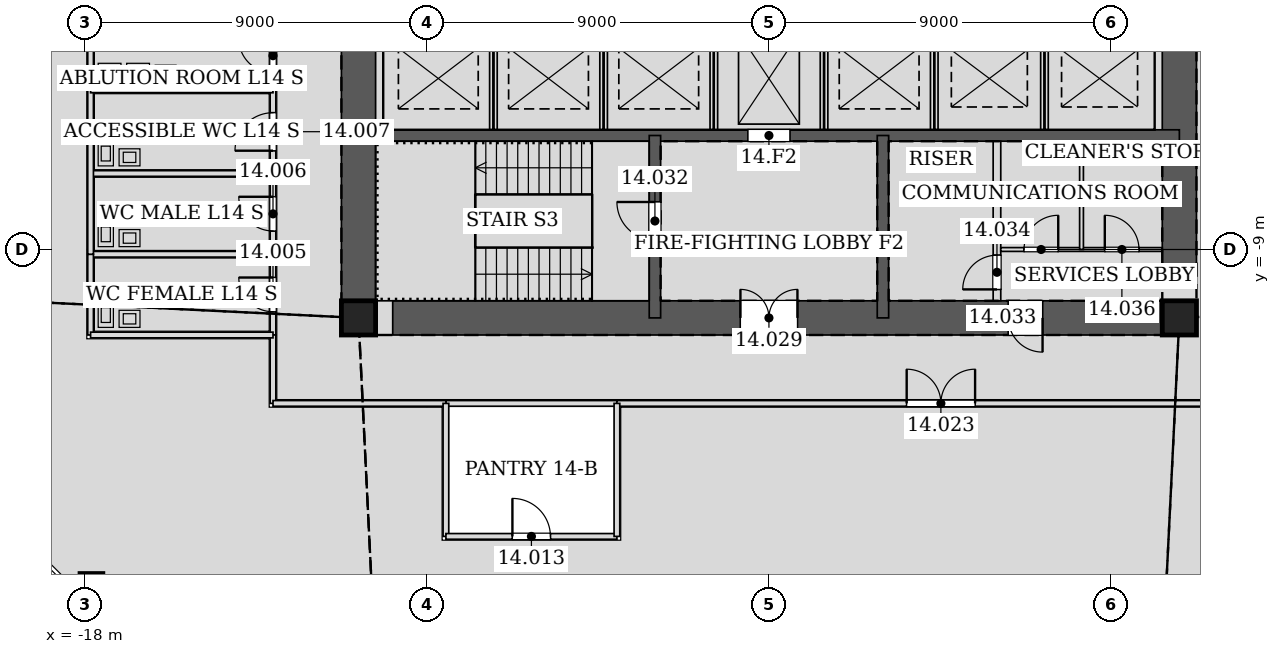
"""IFC4 building model, lengths in metres.
Left out: names, types, materials, properties, quantities, classifications, styles, units other than length and angle.
Written with IfcOpenShell. Run it as: python <this file> out.ifc"""

import sys

from ifc_helpers import new_model, si_unit, direction, frame, frame_2d, origin, origin_2d, place, context, subcontext, project, spatial, rectangle, hollow_rectangle, extrude, element, fill, save


model = new_model("IFC4")
c1 = context("Model", 3, precision=1e-05, world=origin(), true_north=direction((0.0, 1.0)))
c2 = subcontext(c1, "Body", "Model", "MODEL_VIEW")
j1 = project(units=[si_unit("LENGTHUNIT", "METRE"), si_unit("PLANEANGLEUNIT", "RADIAN")], contexts=[c1])
p1 = place(None, origin())
s1 = spatial("IfcSite", under=j1, at=p1, CompositionType="ELEMENT")
p2 = place(p1, origin())
s2 = spatial("IfcBuilding", under=s1, at=p2, CompositionType="ELEMENT")
p3 = place(p2, frame((0.0, 0.0, 66.6)))
s3 = spatial("IfcBuildingStorey", under=s2, at=p3, CompositionType="ELEMENT", Elevation=66.6)
p4 = place(p3, frame((-17.912, -17.912, 0.0), z_axis=(0.020046580746, 0.020046580746, 0.99959805382), x_axis=(-0.707106781187, 0.707106781187, 0.0)))
e1 = element("IfcColumn", 1, at=p4, inside=s3, PredefinedType="COLUMN", context=c2, shape_type="SweptSolid", body=[
    extrude(hollow_rectangle(XDim=0.6, YDim=0.6, WallThickness=0.032, at=origin_2d()), origin(), (0.0, 0.0, 1.0), 4.202),
])
for number, where, z_axis, x_axis in (
    (2, (-10.8, -10.8, 0.0), (0.0, 0.0, 1.0), (1.0, 0.0, 0.0)),
    (3, (10.8, -10.8, 0.0), (0.0, 0.0, 1.0), (1.0, 0.0, 0.0)),
):
    element("IfcColumn", number, at=place(p3, frame(where, z_axis=z_axis, x_axis=x_axis)), inside=s3, PredefinedType="COLUMN", context=c2, shape_type="SweptSolid", body=[
        extrude(hollow_rectangle(XDim=0.9, YDim=0.9, WallThickness=0.06, at=origin_2d()), origin(), (0.0, 0.0, 1.0), 4.2),
    ])
p5 = place(p3, frame((-10.8, -10.8, 0.0), z_axis=(0.0, 0.0, 1.0), x_axis=(1.0, 0.0, 0.0)))
e4 = element("IfcWall", 4, at=p5, inside=s3, PredefinedType="SOLIDWALL", context=c2, shape_type="SweptSolid", body=[
    extrude(rectangle(XDim=21.6, YDim=0.9, at=frame_2d((10.8, 0.0))), origin(), (0.0, 0.0, 1.0), 4.2),
])
p6 = place(p5, frame((10.05, 0.0, 0.0)))
e5 = element("IfcOpeningElement", 5, at=p6, cuts=e4, PredefinedType="OPENING", context=c2, shape_type="SweptSolid", body=[
    extrude(rectangle(XDim=1.5, YDim=2.1, at=frame_2d((0.75, 1.05))), frame((0.0, 0.46, 0.0), z_axis=(0.0, -1.0, 0.0), x_axis=(1.0, 0.0, 0.0)), (0.0, 0.0, 1.0), 0.92),
])
p7 = place(p5, frame((17.1, 0.0, 0.0)))
e6 = element("IfcOpeningElement", 6, at=p7, cuts=e4, PredefinedType="OPENING", context=c2, shape_type="SweptSolid", body=[
    extrude(rectangle(XDim=0.9, YDim=2.1, at=frame_2d((0.45, 1.05))), frame((0.0, 0.46, 0.0), z_axis=(0.0, -1.0, 0.0), x_axis=(1.0, 0.0, 0.0)), (0.0, 0.0, 1.0), 0.92),
])
p8 = place(p3, frame((10.8, -10.8, 0.0), z_axis=(0.0, 0.0, 1.0), x_axis=(0.0, 1.0, 0.0)))
e7 = element("IfcWall", 7, at=p8, inside=s3, PredefinedType="SOLIDWALL", context=c2, shape_type="SweptSolid", body=[
    extrude(rectangle(XDim=21.6, YDim=0.9, at=frame_2d((10.8, 0.0))), origin(), (0.0, 0.0, 1.0), 4.2),
])
p9 = place(p8, frame((11.7, 0.0, 0.0)))
e8 = element("IfcOpeningElement", 8, at=p9, cuts=e7, PredefinedType="OPENING", context=c2, shape_type="SweptSolid", body=[
    extrude(rectangle(XDim=1.2, YDim=2.1, at=frame_2d((0.6, 1.05))), frame((0.0, 0.46, 0.0), z_axis=(0.0, -1.0, 0.0), x_axis=(1.0, 0.0, 0.0)), (0.0, 0.0, 1.0), 0.92),
])
p10 = place(p8, frame((8.7, 0.0, 0.0)))
e9 = element("IfcOpeningElement", 9, at=p10, cuts=e7, PredefinedType="OPENING", context=c2, shape_type="SweptSolid", body=[
    extrude(rectangle(XDim=1.2, YDim=2.1, at=frame_2d((0.6, 1.05))), frame((0.0, 0.46, 0.0), z_axis=(0.0, -1.0, 0.0), x_axis=(1.0, 0.0, 0.0)), (0.0, 0.0, 1.0), 0.92),
])
p11 = place(p3, frame((-10.8, 10.8, 0.0), z_axis=(0.0, 0.0, 1.0), x_axis=(0.0, -1.0, 0.0)))
e10 = element("IfcWall", 10, at=p11, inside=s3, PredefinedType="SOLIDWALL", context=c2, shape_type="SweptSolid", body=[
    extrude(rectangle(XDim=21.6, YDim=0.9, at=frame_2d((10.8, 0.0))), origin(), (0.0, 0.0, 1.0), 4.2),
])
p12 = place(p11, frame((8.7, 0.0, 0.0)))
e11 = element("IfcOpeningElement", 11, at=p12, cuts=e10, PredefinedType="OPENING", context=c2, shape_type="SweptSolid", body=[
    extrude(rectangle(XDim=1.2, YDim=2.1, at=frame_2d((0.6, 1.05))), frame((0.0, 0.46, 0.0), z_axis=(0.0, -1.0, 0.0), x_axis=(1.0, 0.0, 0.0)), (0.0, 0.0, 1.0), 0.92),
])
p13 = place(p11, frame((11.7, 0.0, 0.0)))
e12 = element("IfcOpeningElement", 12, at=p13, cuts=e10, PredefinedType="OPENING", context=c2, shape_type="SweptSolid", body=[
    extrude(rectangle(XDim=1.2, YDim=2.1, at=frame_2d((0.6, 1.05))), frame((0.0, 0.46, 0.0), z_axis=(0.0, -1.0, 0.0), x_axis=(1.0, 0.0, 0.0)), (0.0, 0.0, 1.0), 0.92),
])
p14 = place(p3, frame((-10.8, -6.0, 0.0), z_axis=(0.0, 0.0, 1.0), x_axis=(1.0, 0.0, 0.0)))
e13 = element("IfcWall", 13, at=p14, inside=s3, PredefinedType="SOLIDWALL", context=c2, shape_type="SweptSolid", body=[
    extrude(rectangle(XDim=21.6, YDim=0.3, at=frame_2d((10.8, 0.0))), origin(), (0.0, 0.0, 1.0), 4.2),
])
p15 = place(p14, frame((10.25, 0.0, 0.0)))
e14 = element("IfcOpeningElement", 14, at=p15, cuts=e13, PredefinedType="OPENING", context=c2, shape_type="SweptSolid", body=[
    extrude(rectangle(XDim=1.1, YDim=2.1, at=frame_2d((0.55, 1.05))), frame((0.0, 0.16, 0.0), z_axis=(0.0, -1.0, 0.0), x_axis=(1.0, 0.0, 0.0)), (0.0, 0.0, 1.0), 0.32),
])
p16 = place(p3, frame((-3.0, -6.0, 0.0), z_axis=(0.0, 0.0, 1.0), x_axis=(0.0, -1.0, 0.0)))
e15 = element("IfcWall", 15, at=p16, inside=s3, PredefinedType="SOLIDWALL", context=c2, shape_type="SweptSolid", body=[
    extrude(rectangle(XDim=4.8, YDim=0.3, at=frame_2d((2.4, 0.0))), origin(), (0.0, 0.0, 1.0), 4.2),
])
p17 = place(p16, frame((1.75, 0.0, 0.0)))
e16 = element("IfcOpeningElement", 16, at=p17, cuts=e15, PredefinedType="OPENING", context=c2, shape_type="SweptSolid", body=[
    extrude(rectangle(XDim=1.0, YDim=2.1, at=frame_2d((0.5, 1.05))), frame((0.0, 0.16, 0.0), z_axis=(0.0, -1.0, 0.0), x_axis=(1.0, 0.0, 0.0)), (0.0, 0.0, 1.0), 0.32),
])
p18 = place(p3, frame((3.0, -6.0, 0.0), z_axis=(0.0, 0.0, 1.0), x_axis=(0.0, -1.0, 0.0)))
e17 = element("IfcWall", 17, at=p18, inside=s3, PredefinedType="SOLIDWALL", context=c2, shape_type="SweptSolid", body=[
    extrude(rectangle(XDim=4.8, YDim=0.3, at=frame_2d((2.4, 0.0))), origin(), (0.0, 0.0, 1.0), 4.2),
])
p19 = place(p3, frame((-13.05, -9.124, 0.0), z_axis=(0.0, 0.0, 1.0), x_axis=(0.0, -1.0, 0.0)))
e18 = element("IfcWall", 18, at=p19, inside=s3, PredefinedType="PARTITIONING", context=c2, shape_type="SweptSolid", body=[
    extrude(rectangle(XDim=2.127, YDim=0.15, at=frame_2d((1.063, 0.0))), origin(), (0.0, 0.0, 1.0), 3.014),
])
p20 = place(p19, frame((0.614, 0.0, 0.0)))
e19 = element("IfcOpeningElement", 19, at=p20, cuts=e18, PredefinedType="OPENING", context=c2, shape_type="SweptSolid", body=[
    extrude(rectangle(XDim=0.9, YDim=2.1, at=frame_2d((0.45, 1.05))), frame((0.0, 0.085, 0.0), z_axis=(0.0, -1.0, 0.0), x_axis=(1.0, 0.0, 0.0)), (0.0, 0.0, 1.0), 0.17),
])
p21 = place(p3, frame((-13.05, -6.999, 0.0), z_axis=(0.0, 0.0, 1.0), x_axis=(0.0, -1.0, 0.0)))
e20 = element("IfcWall", 20, at=p21, inside=s3, PredefinedType="PARTITIONING", context=c2, shape_type="SweptSolid", body=[
    extrude(rectangle(XDim=2.127, YDim=0.15, at=frame_2d((1.063, 0.0))), origin(), (0.0, 0.0, 1.0), 4.035),
])
p22 = place(p21, frame((0.614, 0.0, 0.0)))
e21 = element("IfcOpeningElement", 21, at=p22, cuts=e20, PredefinedType="OPENING", context=c2, shape_type="SweptSolid", body=[
    extrude(rectangle(XDim=0.9, YDim=2.1, at=frame_2d((0.45, 1.05))), frame((0.0, 0.085, 0.0), z_axis=(0.0, -1.0, 0.0), x_axis=(1.0, 0.0, 0.0)), (0.0, 0.0, 1.0), 0.17),
])
p23 = place(p3, frame((-13.05, -4.799, 0.0), z_axis=(0.0, 0.0, 1.0), x_axis=(0.0, -1.0, 0.0)))
e22 = element("IfcWall", 22, at=p23, inside=s3, PredefinedType="PARTITIONING", context=c2, shape_type="SweptSolid", body=[
    extrude(rectangle(XDim=2.202, YDim=0.15, at=frame_2d((1.101, 0.0))), origin(), (0.0, 0.0, 1.0), 4.035),
])
p24 = place(p23, frame((0.601, 0.0, 0.0)))
e23 = element("IfcOpeningElement", 23, at=p24, cuts=e22, PredefinedType="OPENING", context=c2, shape_type="SweptSolid", body=[
    extrude(rectangle(XDim=1.0, YDim=2.1, at=frame_2d((0.5, 1.05))), frame((0.0, 0.085, 0.0), z_axis=(0.0, -1.0, 0.0), x_axis=(1.0, 0.0, 0.0)), (0.0, 0.0, 1.0), 0.17),
])
p25 = place(p3, frame((-13.05, -2.999, 0.0), z_axis=(0.0, 0.0, 1.0), x_axis=(0.0, -1.0, 0.0)))
e24 = element("IfcWall", 24, at=p25, inside=s3, PredefinedType="PARTITIONING", context=c2, shape_type="SweptSolid", body=[
    extrude(rectangle(XDim=1.802, YDim=0.15, at=frame_2d((0.901, 0.0))), origin(), (0.0, 0.0, 1.0), 4.035),
])
p26 = place(p25, frame((0.451, 0.0, 0.0)))
e25 = element("IfcOpeningElement", 25, at=p26, cuts=e24, PredefinedType="OPENING", context=c2, shape_type="SweptSolid", body=[
    extrude(rectangle(XDim=0.9, YDim=2.1, at=frame_2d((0.45, 1.05))), frame((0.0, 0.085, 0.0), z_axis=(0.0, -1.0, 0.0), x_axis=(1.0, 0.0, 0.0)), (0.0, 0.0, 1.0), 0.17),
])
p27 = place(p3, frame((-8.501, -13.05, 0.0), z_axis=(0.0, 0.0, 1.0), x_axis=(1.0, 0.0, 0.0)))
e26 = element("IfcWall", 26, at=p27, inside=s3, PredefinedType="PARTITIONING", context=c2, shape_type="SweptSolid", body=[
    extrude(rectangle(XDim=4.502, YDim=0.15, at=frame_2d((2.251, 0.0))), origin(), (0.0, 0.0, 1.0), 4.035),
])
p28 = place(p3, frame((-13.05, -11.249, 0.0), z_axis=(0.0, 0.0, 1.0), x_axis=(0.0, -1.0, 0.0)))
e27 = element("IfcWall", 27, at=p28, inside=s3, PredefinedType="PARTITIONING", context=c2, shape_type="SweptSolid", body=[
    extrude(rectangle(XDim=1.801, YDim=0.15, at=frame_2d((0.9, 0.0))), origin(), (0.0, 0.0, 1.0), 3.167),
])
p29 = place(p3, frame((-13.05, -13.05, 0.0), z_axis=(0.0, 0.0, 1.0), x_axis=(1.0, 0.0, 0.0)))
e28 = element("IfcWall", 28, at=p29, inside=s3, PredefinedType="PARTITIONING", context=c2, shape_type="SweptSolid", body=[
    extrude(rectangle(XDim=4.551, YDim=0.15, at=frame_2d((2.275, 0.0))), origin(), (0.0, 0.0, 1.0), 3.014),
])
p30 = place(p3, frame((-4.001, -13.05, 0.0), z_axis=(0.0, 0.0, 1.0), x_axis=(1.0, 0.0, 0.0)))
e29 = element("IfcWall", 29, at=p30, inside=s3, PredefinedType="PARTITIONING", context=c2, shape_type="SweptSolid", body=[
    extrude(rectangle(XDim=17.051, YDim=0.15, at=frame_2d((8.525, 0.0))), origin(), (0.0, 0.0, 1.0), 3.014),
])
p31 = place(p30, frame((7.625, 0.0, 0.0)))
e30 = element("IfcOpeningElement", 30, at=p31, cuts=e29, PredefinedType="OPENING", context=c2, shape_type="SweptSolid", body=[
    extrude(rectangle(XDim=1.8, YDim=2.4, at=frame_2d((0.9, 1.2))), frame((0.0, 0.085, 0.0), z_axis=(0.0, -1.0, 0.0), x_axis=(1.0, 0.0, 0.0)), (0.0, 0.0, 1.0), 0.17),
])
p32 = place(p3, frame((-13.05, -9.125, 0.0), z_axis=(0.0, 0.0, 1.0), x_axis=(-1.0, 0.0, 0.0)))
e31 = element("IfcWall", 31, at=p32, inside=s3, PredefinedType="PARTITIONING", context=c2, shape_type="SweptSolid", body=[
    extrude(rectangle(XDim=4.8, YDim=0.15, at=frame_2d((2.4, 0.0))), origin(), (0.0, 0.0, 1.0), 3.423),
])
p33 = place(p3, frame((-17.85, -9.125, 0.0), z_axis=(0.0, 0.0, 1.0), x_axis=(0.0, -1.0, 0.0)))
e32 = element("IfcWall", 32, at=p33, inside=s3, PredefinedType="PARTITIONING", context=c2, shape_type="SweptSolid", body=[
    extrude(rectangle(XDim=2.125, YDim=0.15, at=frame_2d((1.062, 0.0))), origin(), (0.0, 0.0, 1.0), 3.014),
])
p34 = place(p3, frame((-17.85, -11.25, 0.0), z_axis=(0.0, 0.0, 1.0), x_axis=(1.0, 0.0, 0.0)))
e33 = element("IfcWall", 33, at=p34, inside=s3, PredefinedType="PARTITIONING", context=c2, shape_type="SweptSolid", body=[
    extrude(rectangle(XDim=4.8, YDim=0.15, at=frame_2d((2.4, 0.0))), origin(), (0.0, 0.0, 1.0), 3.715),
])
p35 = place(p3, frame((-13.05, -7.0, 0.0), z_axis=(0.0, 0.0, 1.0), x_axis=(-1.0, 0.0, 0.0)))
e34 = element("IfcWall", 34, at=p35, inside=s3, PredefinedType="PARTITIONING", context=c2, shape_type="SweptSolid", body=[
    extrude(rectangle(XDim=4.8, YDim=0.15, at=frame_2d((2.4, 0.0))), origin(), (0.0, 0.0, 1.0), 3.423),
])
p36 = place(p3, frame((-17.85, -9.125, 0.0), z_axis=(0.0, 0.0, 1.0), x_axis=(0.0, 1.0, 0.0)))
e35 = element("IfcWall", 35, at=p36, inside=s3, PredefinedType="PARTITIONING", context=c2, shape_type="SweptSolid", body=[
    extrude(rectangle(XDim=6.125, YDim=0.15, at=frame_2d((3.062, 0.0))), origin(), (0.0, 0.0, 1.0), 4.035),
])
p37 = place(p3, frame((-13.05, -4.8, 0.0), z_axis=(0.0, 0.0, 1.0), x_axis=(-1.0, 0.0, 0.0)))
e36 = element("IfcWall", 36, at=p37, inside=s3, PredefinedType="PARTITIONING", context=c2, shape_type="SweptSolid", body=[
    extrude(rectangle(XDim=4.8, YDim=0.15, at=frame_2d((2.4, 0.0))), origin(), (0.0, 0.0, 1.0), 3.423),
])
p38 = place(p3, frame((-8.5, -13.05, 0.0), z_axis=(0.0, 0.0, 1.0), x_axis=(0.0, -1.0, 0.0)))
e37 = element("IfcWall", 37, at=p38, inside=s3, PredefinedType="PARTITIONING", context=c2, shape_type="SweptSolid", body=[
    extrude(rectangle(XDim=3.5, YDim=0.15, at=frame_2d((1.75, 0.0))), origin(), (0.0, 0.0, 1.0), 3.423),
])
p39 = place(p3, frame((-8.5, -16.55, 0.0), z_axis=(0.0, 0.0, 1.0), x_axis=(1.0, 0.0, 0.0)))
e38 = element("IfcWall", 38, at=p39, inside=s3, PredefinedType="PARTITIONING", context=c2, shape_type="SweptSolid", body=[
    extrude(rectangle(XDim=4.5, YDim=0.15, at=frame_2d((2.25, 0.0))), origin(), (0.0, 0.0, 1.0), 3.497),
])
p40 = place(p39, frame((1.75, 0.0, 0.0)))
e39 = element("IfcOpeningElement", 39, at=p40, cuts=e38, PredefinedType="OPENING", context=c2, shape_type="SweptSolid", body=[
    extrude(rectangle(XDim=1.0, YDim=2.1, at=frame_2d((0.5, 1.05))), frame((0.0, 0.085, 0.0), z_axis=(0.0, -1.0, 0.0), x_axis=(1.0, 0.0, 0.0)), (0.0, 0.0, 1.0), 0.17),
])
p41 = place(p3, frame((-4.0, -16.55, 0.0), z_axis=(0.0, 0.0, 1.0), x_axis=(0.0, 1.0, 0.0)))
e40 = element("IfcWall", 40, at=p41, inside=s3, PredefinedType="PARTITIONING", context=c2, shape_type="SweptSolid", body=[
    extrude(rectangle(XDim=3.5, YDim=0.15, at=frame_2d((1.75, 0.0))), origin(), (0.0, 0.0, 1.0), 3.423),
])
for number, where, z_axis, x_axis in (
    (41, (-7.25, -5.85, 0.0), (0.0, 0.0, 1.0), (0.0, 1.0, 0.0)),
    (42, (-4.35, -5.85, 0.0), (0.0, 0.0, 1.0), (0.0, 1.0, 0.0)),
    (43, (-1.45, -5.85, 0.0), (0.0, 0.0, 1.0), (0.0, 1.0, 0.0)),
    (44, (1.45, -5.85, 0.0), (0.0, 0.0, 1.0), (0.0, 1.0, 0.0)),
    (45, (4.35, -5.85, 0.0), (0.0, 0.0, 1.0), (0.0, 1.0, 0.0)),
    (46, (7.25, -5.85, 0.0), (0.0, 0.0, 1.0), (0.0, 1.0, 0.0)),
):
    element("IfcWall", number, at=place(p3, frame(where, z_axis=z_axis, x_axis=x_axis)), inside=s3, PredefinedType="PARTITIONING", context=c2, shape_type="SweptSolid", body=[
        extrude(rectangle(XDim=2.7, YDim=0.2, at=frame_2d((1.35, 0.0))), origin(), (0.0, 0.0, 1.0), 4.2),
    ])
p42 = place(p3, frame((6.0, -10.35, 0.0), z_axis=(0.0, 0.0, 1.0), x_axis=(0.0, 1.0, 0.0)))
e47 = element("IfcWall", 47, at=p42, inside=s3, PredefinedType="PARTITIONING", context=c2, shape_type="SweptSolid", body=[
    extrude(rectangle(XDim=4.2, YDim=0.2, at=frame_2d((2.1, 0.0))), origin(), (0.0, 0.0, 1.0), 4.035),
])
p43 = place(p42, frame((0.3, 0.0, 0.0)))
e48 = element("IfcOpeningElement", 48, at=p43, cuts=e47, PredefinedType="OPENING", context=c2, shape_type="SweptSolid", body=[
    extrude(rectangle(XDim=0.9, YDim=2.1, at=frame_2d((0.45, 1.05))), frame((0.0, 0.11, 0.0), z_axis=(0.0, -1.0, 0.0), x_axis=(1.0, 0.0, 0.0)), (0.0, 0.0, 1.0), 0.22),
])
p44 = place(p3, frame((6.1, -9.0, 0.0), z_axis=(0.0, 0.0, 1.0), x_axis=(1.0, 0.0, 0.0)))
e49 = element("IfcWall", 49, at=p44, inside=s3, PredefinedType="PARTITIONING", context=c2, shape_type="SweptSolid", body=[
    extrude(rectangle(XDim=4.25, YDim=0.1, at=frame_2d((2.125, 0.0))), origin(), (0.0, 0.0, 1.0), 4.035),
])
p45 = place(p44, frame((0.613, 0.0, 0.0)))
e50 = element("IfcOpeningElement", 50, at=p45, cuts=e49, PredefinedType="OPENING", context=c2, shape_type="SweptSolid", body=[
    extrude(rectangle(XDim=0.9, YDim=2.1, at=frame_2d((0.45, 1.05))), frame((0.0, 0.06, 0.0), z_axis=(0.0, -1.0, 0.0), x_axis=(1.0, 0.0, 0.0)), (0.0, 0.0, 1.0), 0.12),
])
p46 = place(p44, frame((2.738, 0.0, 0.0)))
e51 = element("IfcOpeningElement", 51, at=p46, cuts=e49, PredefinedType="OPENING", context=c2, shape_type="SweptSolid", body=[
    extrude(rectangle(XDim=0.9, YDim=2.1, at=frame_2d((0.45, 1.05))), frame((0.0, 0.06, 0.0), z_axis=(0.0, -1.0, 0.0), x_axis=(1.0, 0.0, 0.0)), (0.0, 0.0, 1.0), 0.12),
])
p47 = place(p3, frame((8.225, -9.0, 0.0), z_axis=(0.0, 0.0, 1.0), x_axis=(0.0, 1.0, 0.0)))
e52 = element("IfcWall", 52, at=p47, inside=s3, PredefinedType="PARTITIONING", context=c2, shape_type="SweptSolid", body=[
    extrude(rectangle(XDim=2.85, YDim=0.1, at=frame_2d((1.425, 0.0))), origin(), (0.0, 0.0, 1.0), 4.035),
])
p48 = place(p20, frame((0.9, 0.0, 0.0), z_axis=(0.0, 0.0, 1.0), x_axis=(-1.0, 0.0, 0.0)))
e53 = element("IfcDoor", 53, at=p48, inside=s3, OperationType="SINGLE_SWING_RIGHT", PredefinedType="DOOR", context=c2, shape_type="SweptSolid", body=[
    extrude(rectangle(XDim=0.9, YDim=2.1, at=frame_2d((0.45, 1.05))), frame((0.0, 0.025, 0.0), z_axis=(0.0, -1.0, 0.0), x_axis=(1.0, 0.0, 0.0)), (0.0, 0.0, 1.0), 0.05),
])
fill(e19, e53)
p49 = place(p22, frame((0.9, 0.0, 0.0), z_axis=(0.0, 0.0, 1.0), x_axis=(-1.0, 0.0, 0.0)))
e54 = element("IfcDoor", 54, at=p49, inside=s3, OperationType="SINGLE_SWING_RIGHT", PredefinedType="DOOR", context=c2, shape_type="SweptSolid", body=[
    extrude(rectangle(XDim=0.9, YDim=2.1, at=frame_2d((0.45, 1.05))), frame((0.0, 0.025, 0.0), z_axis=(0.0, -1.0, 0.0), x_axis=(1.0, 0.0, 0.0)), (0.0, 0.0, 1.0), 0.05),
])
fill(e21, e54)
p50 = place(p24, frame((1.0, 0.0, 0.0), z_axis=(0.0, 0.0, 1.0), x_axis=(-1.0, 0.0, 0.0)))
e55 = element("IfcDoor", 55, at=p50, inside=s3, OperationType="SINGLE_SWING_LEFT", PredefinedType="DOOR", context=c2, shape_type="SweptSolid", body=[
    extrude(rectangle(XDim=1.0, YDim=2.1, at=frame_2d((0.5, 1.05))), frame((0.0, 0.025, 0.0), z_axis=(0.0, -1.0, 0.0), x_axis=(1.0, 0.0, 0.0)), (0.0, 0.0, 1.0), 0.05),
])
fill(e23, e55)
p51 = place(p26, frame((0.9, 0.0, 0.0), z_axis=(0.0, 0.0, 1.0), x_axis=(-1.0, 0.0, 0.0)))
e56 = element("IfcDoor", 56, at=p51, inside=s3, OperationType="SINGLE_SWING_RIGHT", PredefinedType="DOOR", context=c2, shape_type="SweptSolid", body=[
    extrude(rectangle(XDim=0.9, YDim=2.1, at=frame_2d((0.45, 1.05))), frame((0.0, 0.025, 0.0), z_axis=(0.0, -1.0, 0.0), x_axis=(1.0, 0.0, 0.0)), (0.0, 0.0, 1.0), 0.05),
])
fill(e25, e56)
p52 = place(p40, origin())
e57 = element("IfcDoor", 57, at=p52, inside=s3, OperationType="SINGLE_SWING_LEFT", PredefinedType="DOOR", context=c2, shape_type="SweptSolid", body=[
    extrude(rectangle(XDim=1.0, YDim=2.1, at=frame_2d((0.5, 1.05))), frame((0.0, 0.025, 0.0), z_axis=(0.0, -1.0, 0.0), x_axis=(1.0, 0.0, 0.0)), (0.0, 0.0, 1.0), 0.05),
])
fill(e39, e57)
p53 = place(p31, origin())
e58 = element("IfcDoor", 58, at=p53, inside=s3, OperationType="DOUBLE_DOOR_SINGLE_SWING", PredefinedType="DOOR", context=c2, shape_type="SweptSolid", body=[
    extrude(rectangle(XDim=1.8, YDim=2.4, at=frame_2d((0.9, 1.2))), frame((0.0, 0.025, 0.0), z_axis=(0.0, -1.0, 0.0), x_axis=(1.0, 0.0, 0.0)), (0.0, 0.0, 1.0), 0.05),
])
fill(e30, e58)
p54 = place(p6, origin())
e59 = element("IfcDoor", 59, at=p54, inside=s3, OperationType="DOUBLE_DOOR_SINGLE_SWING", PredefinedType="DOOR", context=c2, shape_type="SweptSolid", body=[
    extrude(rectangle(XDim=1.5, YDim=2.1, at=frame_2d((0.75, 1.05))), frame((0.0, 0.025, 0.0), z_axis=(0.0, -1.0, 0.0), x_axis=(1.0, 0.0, 0.0)), (0.0, 0.0, 1.0), 0.05),
])
fill(e5, e59)
p55 = place(p17, frame((1.0, 0.0, 0.0), z_axis=(0.0, 0.0, 1.0), x_axis=(-1.0, 0.0, 0.0)))
e60 = element("IfcDoor", 60, at=p55, inside=s3, OperationType="SINGLE_SWING_RIGHT", PredefinedType="DOOR", context=c2, shape_type="SweptSolid", body=[
    extrude(rectangle(XDim=1.0, YDim=2.1, at=frame_2d((0.5, 1.05))), frame((0.0, 0.025, 0.0), z_axis=(0.0, -1.0, 0.0), x_axis=(1.0, 0.0, 0.0)), (0.0, 0.0, 1.0), 0.05),
])
fill(e16, e60)
p56 = place(p7, frame((0.9, 0.0, 0.0), z_axis=(0.0, 0.0, 1.0), x_axis=(-1.0, 0.0, 0.0)))
e61 = element("IfcDoor", 61, at=p56, inside=s3, OperationType="SINGLE_SWING_LEFT", PredefinedType="DOOR", context=c2, shape_type="SweptSolid", body=[
    extrude(rectangle(XDim=0.9, YDim=2.1, at=frame_2d((0.45, 1.05))), frame((0.0, 0.025, 0.0), z_axis=(0.0, -1.0, 0.0), x_axis=(1.0, 0.0, 0.0)), (0.0, 0.0, 1.0), 0.05),
])
fill(e6, e61)
p57 = place(p43, origin())
e62 = element("IfcDoor", 62, at=p57, inside=s3, OperationType="SINGLE_SWING_LEFT", PredefinedType="DOOR", context=c2, shape_type="SweptSolid", body=[
    extrude(rectangle(XDim=0.9, YDim=2.1, at=frame_2d((0.45, 1.05))), frame((0.0, 0.025, 0.0), z_axis=(0.0, -1.0, 0.0), x_axis=(1.0, 0.0, 0.0)), (0.0, 0.0, 1.0), 0.05),
])
fill(e48, e62)
p58 = place(p45, origin())
e63 = element("IfcDoor", 63, at=p58, inside=s3, OperationType="SINGLE_SWING_RIGHT", PredefinedType="DOOR", context=c2, shape_type="SweptSolid", body=[
    extrude(rectangle(XDim=0.9, YDim=2.1, at=frame_2d((0.45, 1.05))), frame((0.0, 0.025, 0.0), z_axis=(0.0, -1.0, 0.0), x_axis=(1.0, 0.0, 0.0)), (0.0, 0.0, 1.0), 0.05),
])
fill(e50, e63)
p59 = place(p46, origin())
e64 = element("IfcDoor", 64, at=p59, inside=s3, OperationType="SINGLE_SWING_LEFT", PredefinedType="DOOR", context=c2, shape_type="SweptSolid", body=[
    extrude(rectangle(XDim=0.9, YDim=2.1, at=frame_2d((0.45, 1.05))), frame((0.0, 0.025, 0.0), z_axis=(0.0, -1.0, 0.0), x_axis=(1.0, 0.0, 0.0)), (0.0, 0.0, 1.0), 0.05),
])
fill(e51, e64)
p60 = place(p15, origin())
e65 = element("IfcDoor", 65, at=p60, inside=s3, OperationType="DOUBLE_DOOR_SLIDING", PredefinedType="DOOR", context=c2, shape_type="SweptSolid", body=[
    extrude(rectangle(XDim=1.1, YDim=2.1, at=frame_2d((0.55, 1.05))), frame((0.0, 0.025, 0.0), z_axis=(0.0, -1.0, 0.0), x_axis=(1.0, 0.0, 0.0)), (0.0, 0.0, 1.0), 0.05),
])
fill(e14, e65)
save(model, sys.argv[1])
